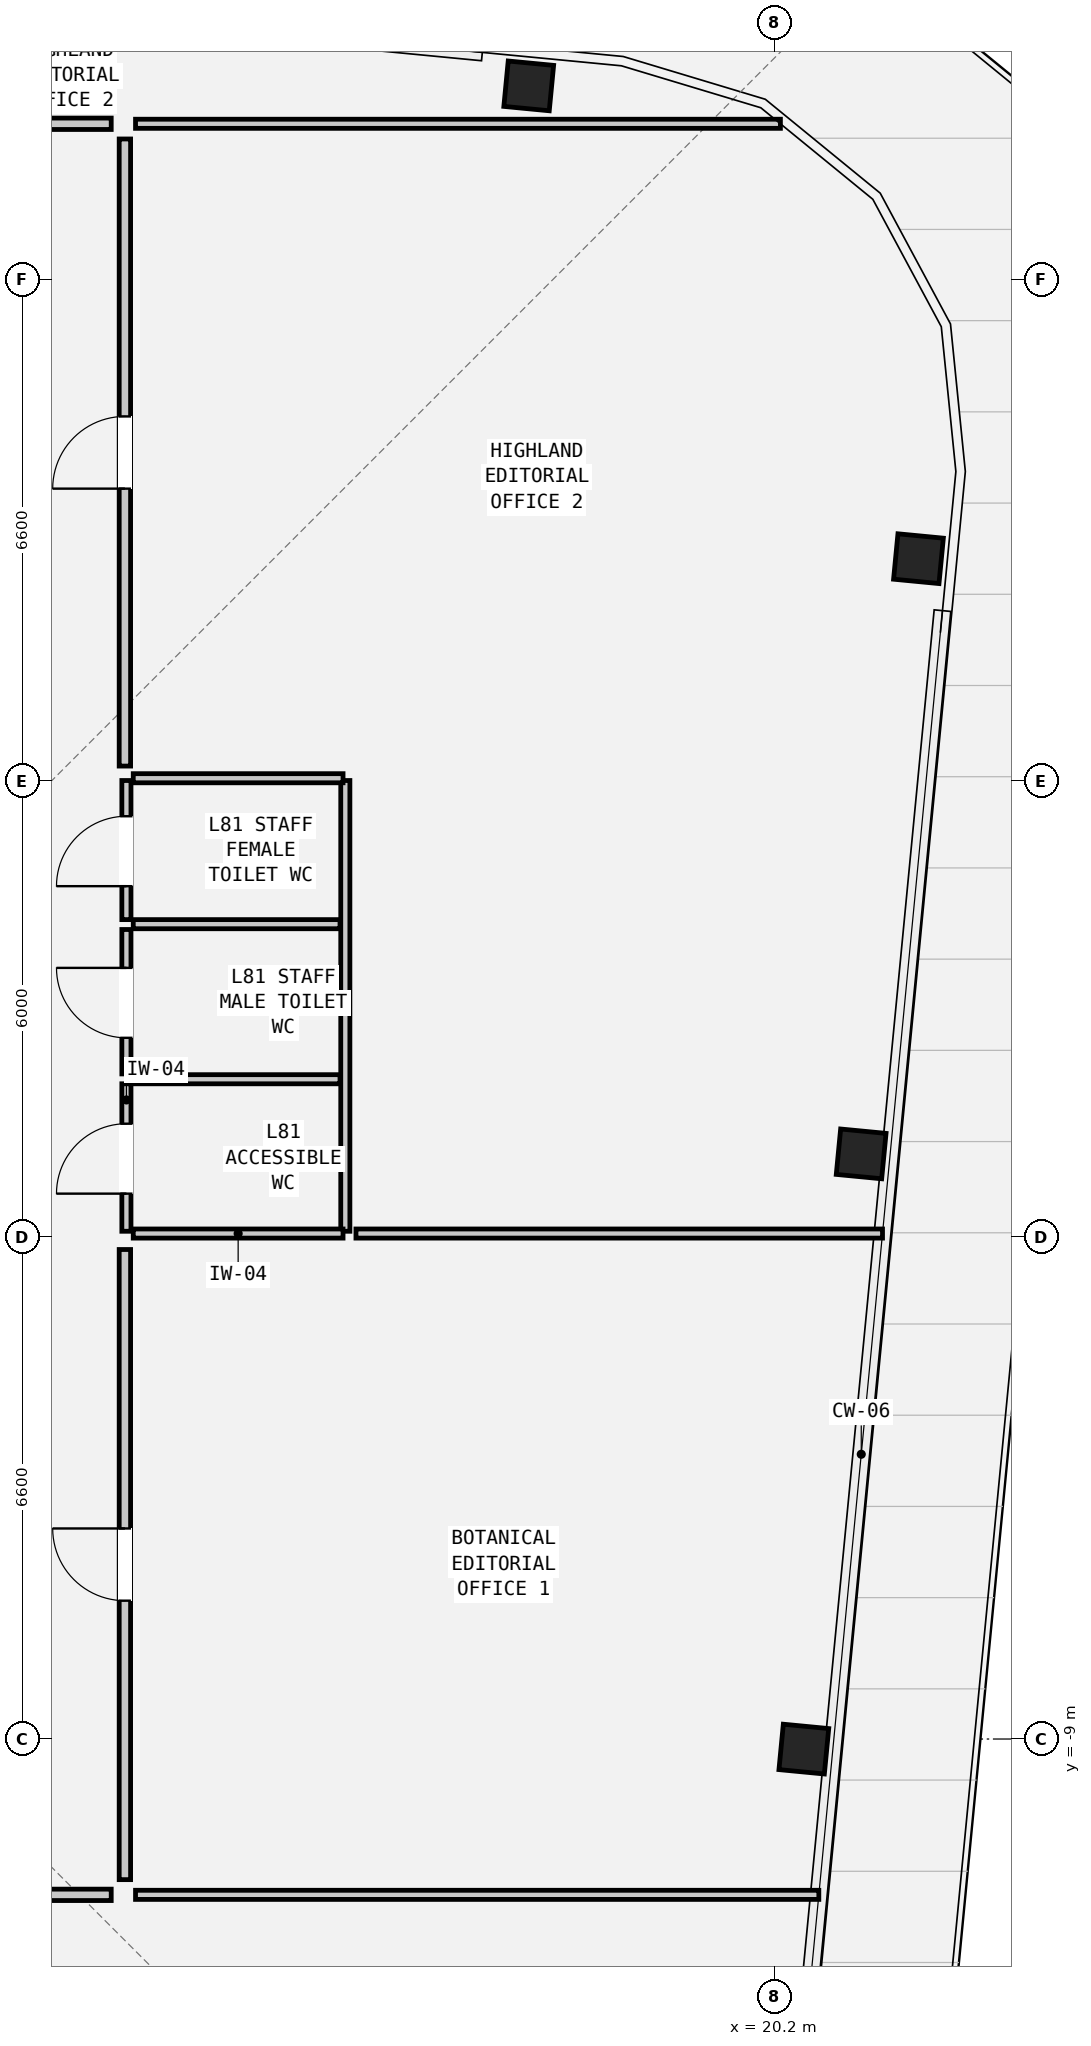
"""IFC4 building model, lengths in metres.
Left out: names, types, materials, properties, quantities, classifications, styles, units other than length and angle.
Written with IfcOpenShell. Run it as: python <this file> out.ifc"""

import sys

from ifc_helpers import new_model, si_unit, direction, frame, frame_2d, origin, origin_2d, place, context, subcontext, project, spatial, rectangle, hollow_rectangle, extrude, element, fill, save


model = new_model("IFC4")
c1 = context("Model", 3, precision=1e-05, world=origin(), true_north=direction((0.0, 1.0)))
c2 = subcontext(c1, "Body", "Model", "MODEL_VIEW")
j1 = project(units=[si_unit("LENGTHUNIT", "METRE"), si_unit("PLANEANGLEUNIT", "RADIAN")], contexts=[c1])
p1 = place(None, origin())
s1 = spatial("IfcSite", under=j1, at=p1, CompositionType="ELEMENT")
p2 = place(p1, origin())
s2 = spatial("IfcBuilding", under=s1, at=p2, CompositionType="ELEMENT")
p3 = place(p2, frame((0.0, 0.0, 273.35)))
s3 = spatial("IfcBuildingStorey", under=s2, at=p3, CompositionType="ELEMENT", Elevation=273.35)
for number, where, z_axis, x_axis in (
    (1, (20.583, -9.133, 0.0), (0.0, 0.0, 1.0), (0.096, 0.995, 0.0)),
    (2, (21.336, -1.302, 0.0), (0.0, 0.0, 1.0), (0.096, 0.995, 0.0)),
    (3, (22.09, 6.528, 0.0), (0.0, 0.0, 1.0), (0.096, 0.995, 0.0)),
    (4, (16.963, 12.749, 0.0), (0.0, 0.0, 1.0), (0.995, -0.096, 0.0)),
):
    element("IfcColumn", number, at=place(p3, frame(where, z_axis=z_axis, x_axis=x_axis)), inside=s3, PredefinedType="COLUMN", context=c2, shape_type="SweptSolid", body=[
        extrude(hollow_rectangle(XDim=0.6, YDim=0.6, WallThickness=0.04, at=origin_2d()), origin(), (0.0, 0.0, 1.0), 3.6),
    ])
p4 = place(p3, frame((11.67, -2.32, 0.0), z_axis=(0.0, 0.0, 1.0), x_axis=(0.0, 1.0, 0.0)))
e5 = element("IfcWall", 5, at=p4, inside=s3, PredefinedType="PARTITIONING", context=c2, shape_type="SweptSolid", body=[
    extrude(rectangle(XDim=1.94, YDim=0.12, at=frame_2d((0.97, 0.0))), origin(), (0.0, 0.0, 1.0), 3.41),
])
p5 = place(p4, frame((0.495, 0.0, 0.0)))
e6 = element("IfcOpeningElement", 6, at=p5, cuts=e5, PredefinedType="OPENING", context=c2, shape_type="SweptSolid", body=[
    extrude(rectangle(XDim=0.92, YDim=2.1, at=frame_2d((0.46, 1.05))), frame((0.0, 0.072, 0.0), z_axis=(0.0, -1.0, 0.0), x_axis=(1.0, 0.0, 0.0)), (0.0, 0.0, 1.0), 0.144),
])
p6 = place(p3, frame((11.67, -0.25, 0.0), z_axis=(0.0, 0.0, 1.0), x_axis=(0.0, 1.0, 0.0)))
e7 = element("IfcWall", 7, at=p6, inside=s3, PredefinedType="PARTITIONING", context=c2, shape_type="SweptSolid", body=[
    extrude(rectangle(XDim=1.9, YDim=0.12, at=frame_2d((0.95, 0.0))), origin(), (0.0, 0.0, 1.0), 3.41),
])
p7 = place(p6, frame((0.475, 0.0, 0.0)))
e8 = element("IfcOpeningElement", 8, at=p7, cuts=e7, PredefinedType="OPENING", context=c2, shape_type="SweptSolid", body=[
    extrude(rectangle(XDim=0.92, YDim=2.1, at=frame_2d((0.46, 1.05))), frame((0.0, 0.072, 0.0), z_axis=(0.0, -1.0, 0.0), x_axis=(1.0, 0.0, 0.0)), (0.0, 0.0, 1.0), 0.144),
])
p8 = place(p3, frame((11.67, 1.78, 0.0), z_axis=(0.0, 0.0, 1.0), x_axis=(0.0, 1.0, 0.0)))
e9 = element("IfcWall", 9, at=p8, inside=s3, PredefinedType="PARTITIONING", context=c2, shape_type="SweptSolid", body=[
    extrude(rectangle(XDim=1.83, YDim=0.12, at=frame_2d((0.915, 0.0))), origin(), (0.0, 0.0, 1.0), 3.41),
])
p9 = place(p8, frame((0.44, 0.0, 0.0)))
e10 = element("IfcOpeningElement", 10, at=p9, cuts=e9, PredefinedType="OPENING", context=c2, shape_type="SweptSolid", body=[
    extrude(rectangle(XDim=0.92, YDim=2.1, at=frame_2d((0.46, 1.05))), frame((0.0, 0.072, 0.0), z_axis=(0.0, -1.0, 0.0), x_axis=(1.0, 0.0, 0.0)), (0.0, 0.0, 1.0), 0.144),
])
p10 = place(p3, frame((14.55, -2.32, 0.0), z_axis=(0.0, 0.0, 1.0), x_axis=(0.0, 1.0, 0.0)))
e11 = element("IfcWall", 11, at=p10, inside=s3, PredefinedType="PARTITIONING", context=c2, shape_type="SweptSolid", body=[
    extrude(rectangle(XDim=5.93, YDim=0.12, at=frame_2d((2.965, 0.0))), origin(), (0.0, 0.0, 1.0), 3.41),
])
for number, where, z_axis, x_axis in (
    (12, (11.76, -2.35, 0.0), (0.0, 0.0, 1.0), (1.0, 0.0, 0.0)),
    (13, (11.76, 3.64, 0.0), (0.0, 0.0, 1.0), (1.0, 0.0, 0.0)),
):
    element("IfcWall", number, at=place(p3, frame(where, z_axis=z_axis, x_axis=x_axis)), inside=s3, PredefinedType="PARTITIONING", context=c2, shape_type="SweptSolid", body=[
        extrude(rectangle(XDim=2.76, YDim=0.12, at=frame_2d((1.38, 0.0))), origin(), (0.0, 0.0, 1.0), 2.61),
    ])
for number, where, z_axis, x_axis in (
    (14, (11.76, -0.32, 0.0), (0.0, 0.0, 1.0), (1.0, 0.0, 0.0)),
    (15, (11.76, 1.72, 0.0), (0.0, 0.0, 1.0), (1.0, 0.0, 0.0)),
):
    element("IfcWall", number, at=place(p3, frame(where, z_axis=z_axis, x_axis=x_axis)), inside=s3, PredefinedType="PARTITIONING", context=c2, shape_type="SweptSolid", body=[
        extrude(rectangle(XDim=2.72, YDim=0.12, at=frame_2d((1.36, 0.0))), origin(), (0.0, 0.0, 1.0), 3.41),
    ])
p11 = place(p3, frame((11.79, 12.25, 0.0), z_axis=(0.0, 0.0, 1.0), x_axis=(1.0, 0.0, 0.0)))
e16 = element("IfcWall", 16, at=p11, inside=s3, PredefinedType="PARTITIONING", context=c2, shape_type="SweptSolid", body=[
    extrude(rectangle(XDim=8.484, YDim=0.12, at=frame_2d((4.242, 0.0))), origin(), (0.0, 0.0, 1.0), 3.41),
])
p12 = place(p3, frame((11.79, -11.05, 0.0), z_axis=(0.0, 0.0, 1.0), x_axis=(1.0, 0.0, 0.0)))
e17 = element("IfcWall", 17, at=p12, inside=s3, PredefinedType="PARTITIONING", context=c2, shape_type="SweptSolid", body=[
    extrude(rectangle(XDim=8.99, YDim=0.12, at=frame_2d((4.495, 0.0))), origin(), (0.0, 0.0, 1.0), 3.41),
])
p13 = place(p3, frame((14.69, -2.35, 0.0), z_axis=(0.0, 0.0, 1.0), x_axis=(1.0, 0.0, 0.0)))
e18 = element("IfcWall", 18, at=p13, inside=s3, PredefinedType="PARTITIONING", context=c2, shape_type="SweptSolid", body=[
    extrude(rectangle(XDim=6.927, YDim=0.12, at=frame_2d((3.464, 0.0))), origin(), (0.0, 0.0, 1.0), 2.61),
])
p14 = place(p3, frame((4.68, 12.25, 0.0), z_axis=(0.0, 0.0, 1.0), x_axis=(1.0, 0.0, 0.0)))
e19 = element("IfcWall", 19, at=p14, inside=s3, PredefinedType="PARTITIONING", context=c2, shape_type="SweptSolid", body=[
    extrude(rectangle(XDim=6.79, YDim=0.15, at=frame_2d((3.395, 0.0))), origin(), (0.0, 0.0, 1.0), 3.41),
])
p15 = place(p14, frame((2.92, 0.0, 0.0)))
e20 = element("IfcOpeningElement", 20, at=p15, cuts=e19, PredefinedType="OPENING", context=c2, shape_type="SweptSolid", body=[
    extrude(rectangle(XDim=0.95, YDim=2.1, at=frame_2d((0.475, 1.05))), frame((0.0, 0.087, 0.0), z_axis=(0.0, -1.0, 0.0), x_axis=(1.0, 0.0, 0.0)), (0.0, 0.0, 1.0), 0.174),
])
p16 = place(p3, frame((6.68, -11.05, 0.0), z_axis=(0.0, 0.0, 1.0), x_axis=(1.0, 0.0, 0.0)))
e21 = element("IfcWall", 21, at=p16, inside=s3, PredefinedType="PARTITIONING", context=c2, shape_type="SweptSolid", body=[
    extrude(rectangle(XDim=4.79, YDim=0.15, at=frame_2d((2.395, 0.0))), origin(), (0.0, 0.0, 1.0), 3.41),
])
p17 = place(p16, frame((1.92, 0.0, 0.0)))
e22 = element("IfcOpeningElement", 22, at=p17, cuts=e21, PredefinedType="OPENING", context=c2, shape_type="SweptSolid", body=[
    extrude(rectangle(XDim=0.95, YDim=2.1, at=frame_2d((0.475, 1.05))), frame((0.0, 0.087, 0.0), z_axis=(0.0, -1.0, 0.0), x_axis=(1.0, 0.0, 0.0)), (0.0, 0.0, 1.0), 0.174),
])
p18 = place(p3, frame((11.65, -10.85, 0.0), z_axis=(0.0, 0.0, 1.0), x_axis=(0.0, 1.0, 0.0)))
e23 = element("IfcWall", 23, at=p18, inside=s3, PredefinedType="PARTITIONING", context=c2, shape_type="SweptSolid", body=[
    extrude(rectangle(XDim=8.29, YDim=0.15, at=frame_2d((4.145, 0.0))), origin(), (0.0, 0.0, 1.0), 3.41),
])
p19 = place(p18, frame((3.67, 0.0, 0.0)))
e24 = element("IfcOpeningElement", 24, at=p19, cuts=e23, PredefinedType="OPENING", context=c2, shape_type="SweptSolid", body=[
    extrude(rectangle(XDim=0.95, YDim=2.1, at=frame_2d((0.475, 1.05))), frame((0.0, 0.087, 0.0), z_axis=(0.0, -1.0, 0.0), x_axis=(1.0, 0.0, 0.0)), (0.0, 0.0, 1.0), 0.174),
])
p20 = place(p3, frame((11.65, 3.8, 0.0), z_axis=(0.0, 0.0, 1.0), x_axis=(0.0, 1.0, 0.0)))
e25 = element("IfcWall", 25, at=p20, inside=s3, PredefinedType="PARTITIONING", context=c2, shape_type="SweptSolid", body=[
    extrude(rectangle(XDim=8.25, YDim=0.15, at=frame_2d((4.125, 0.0))), origin(), (0.0, 0.0, 1.0), 3.41),
])
p21 = place(p20, frame((3.65, 0.0, 0.0)))
e26 = element("IfcOpeningElement", 26, at=p21, cuts=e25, PredefinedType="OPENING", context=c2, shape_type="SweptSolid", body=[
    extrude(rectangle(XDim=0.95, YDim=2.1, at=frame_2d((0.475, 1.05))), frame((0.0, 0.087, 0.0), z_axis=(0.0, -1.0, 0.0), x_axis=(1.0, 0.0, 0.0)), (0.0, 0.0, 1.0), 0.174),
])
p22 = place(p5, origin())
e27 = element("IfcDoor", 27, at=p22, inside=s3, OperationType="SINGLE_SWING_LEFT", PredefinedType="DOOR", context=c2, shape_type="SweptSolid", body=[
    extrude(rectangle(XDim=0.92, YDim=2.1, at=frame_2d((0.46, 1.05))), frame((0.0, 0.025, 0.0), z_axis=(0.0, -1.0, 0.0), x_axis=(1.0, 0.0, 0.0)), (0.0, 0.0, 1.0), 0.05),
])
fill(e6, e27)
p23 = place(p7, origin())
e28 = element("IfcDoor", 28, at=p23, inside=s3, OperationType="SINGLE_SWING_RIGHT", PredefinedType="DOOR", context=c2, shape_type="SweptSolid", body=[
    extrude(rectangle(XDim=0.92, YDim=2.1, at=frame_2d((0.46, 1.05))), frame((0.0, 0.025, 0.0), z_axis=(0.0, -1.0, 0.0), x_axis=(1.0, 0.0, 0.0)), (0.0, 0.0, 1.0), 0.05),
])
fill(e8, e28)
p24 = place(p9, origin())
e29 = element("IfcDoor", 29, at=p24, inside=s3, OperationType="SINGLE_SWING_LEFT", PredefinedType="DOOR", context=c2, shape_type="SweptSolid", body=[
    extrude(rectangle(XDim=0.92, YDim=2.1, at=frame_2d((0.46, 1.05))), frame((0.0, 0.025, 0.0), z_axis=(0.0, -1.0, 0.0), x_axis=(1.0, 0.0, 0.0)), (0.0, 0.0, 1.0), 0.05),
])
fill(e10, e29)
p25 = place(p19, origin())
e30 = element("IfcDoor", 30, at=p25, inside=s3, OperationType="SINGLE_SWING_RIGHT", PredefinedType="DOOR", context=c2, shape_type="SweptSolid", body=[
    extrude(rectangle(XDim=0.95, YDim=2.1, at=frame_2d((0.475, 1.05))), frame((0.0, 0.025, 0.0), z_axis=(0.0, -1.0, 0.0), x_axis=(1.0, 0.0, 0.0)), (0.0, 0.0, 1.0), 0.05),
])
fill(e24, e30)
p26 = place(p21, origin())
e31 = element("IfcDoor", 31, at=p26, inside=s3, OperationType="SINGLE_SWING_LEFT", PredefinedType="DOOR", context=c2, shape_type="SweptSolid", body=[
    extrude(rectangle(XDim=0.95, YDim=2.1, at=frame_2d((0.475, 1.05))), frame((0.0, 0.025, 0.0), z_axis=(0.0, -1.0, 0.0), x_axis=(1.0, 0.0, 0.0)), (0.0, 0.0, 1.0), 0.05),
])
fill(e26, e31)
save(model, sys.argv[1])
